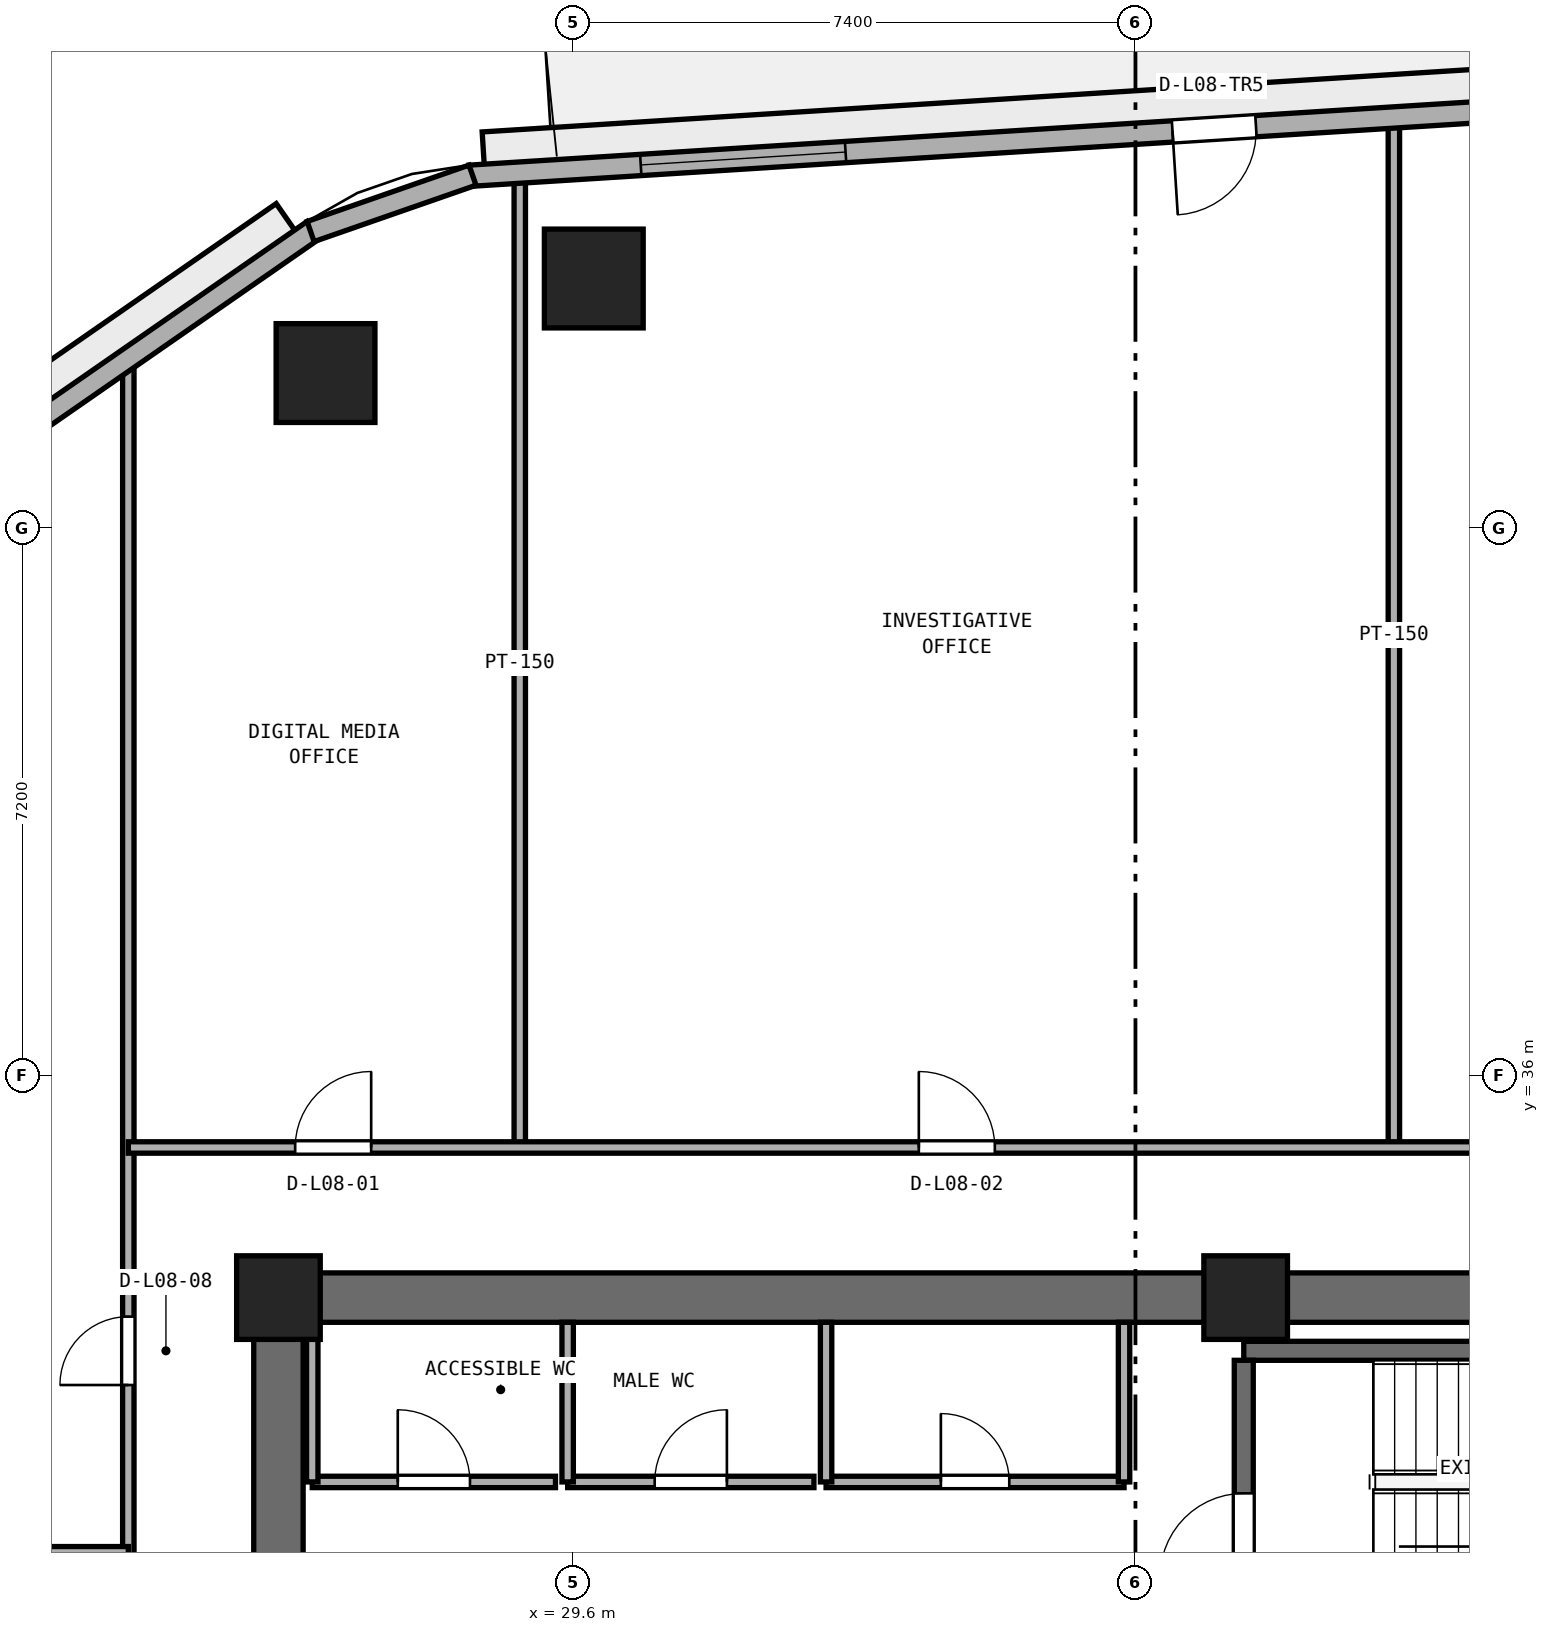
"""IFC4 building model, lengths in metres.
Left out: names, types, materials, properties, quantities, classifications, styles, units other than length and angle.
Written with IfcOpenShell. Run it as: python <this file> out.ifc"""

import sys

from ifc_helpers import new_model, si_unit, direction, frame, frame_2d, origin, origin_2d, place, context, subcontext, project, spatial, rectangle, extrude, element, fill, save


model = new_model("IFC4")
c1 = context("Model", 3, precision=1e-05, world=origin(), true_north=direction((0.0, 1.0)))
c2 = subcontext(c1, "Body", "Model", "MODEL_VIEW")
j1 = project(units=[si_unit("LENGTHUNIT", "METRE"), si_unit("PLANEANGLEUNIT", "RADIAN")], contexts=[c1])
p1 = place(None, origin())
s1 = spatial("IfcSite", under=j1, at=p1, CompositionType="ELEMENT")
p2 = place(p1, origin())
s2 = spatial("IfcBuilding", under=s1, at=p2, CompositionType="ELEMENT")
p3 = place(p2, frame((0.0, 0.0, 36.4)))
s3 = spatial("IfcBuildingStorey", under=s2, at=p3, CompositionType="ELEMENT", Elevation=36.4)
p4 = place(p3, frame((25.4, 33.075, 0.0), z_axis=(0.0, 0.0, 1.0), x_axis=(1.0, 0.0, 0.0)))
e1 = element("IfcWall", 1, at=p4, inside=s3, PredefinedType="SHEAR", context=c2, shape_type="SweptSolid", body=[
    extrude(rectangle(XDim=23.2, YDim=0.65, at=frame_2d((11.6, 0.0))), origin(), (0.0, 0.0, 1.0), 3.525),
])
p5 = place(p3, frame((25.725, 17.65, 0.0), z_axis=(0.0, 0.0, 1.0), x_axis=(0.0, 1.0, 0.0)))
e2 = element("IfcWall", 2, at=p5, inside=s3, PredefinedType="SHEAR", context=c2, shape_type="SweptSolid", body=[
    extrude(rectangle(XDim=15.1, YDim=0.65, at=frame_2d((7.55, 0.0))), origin(), (0.0, 0.0, 1.0), 3.525),
])
p6 = place(p5, frame((6.8, 0.0, 0.0)))
e3 = element("IfcOpeningElement", 3, at=p6, cuts=e2, PredefinedType="OPENING", context=c2, shape_type="SweptSolid", body=[
    extrude(rectangle(XDim=1.5, YDim=2.15, at=frame_2d((0.75, 1.075))), frame((0.0, 0.335, 0.0), z_axis=(0.0, -1.0, 0.0), x_axis=(1.0, 0.0, 0.0)), (0.0, 0.0, 1.0), 0.67),
])
for number, where, z_axis, x_axis in (
    (4, (38.45, 33.075, 0.0), (0.0, 0.0, 1.0), (1.0, 0.0, 0.0)),
    (5, (25.725, 33.075, 0.0), (0.0, 0.0, 1.0), (1.0, 0.0, 0.0)),
):
    element("IfcColumn", number, at=place(p3, frame(where, z_axis=z_axis, x_axis=x_axis)), inside=s3, PredefinedType="PILASTER", context=c2, shape_type="SweptSolid", body=[
        extrude(rectangle(XDim=1.1, YDim=1.1, at=origin_2d()), origin(), (0.0, 0.0, 1.0), 3.8),
    ])
for number, where, z_axis, x_axis in (
    (6, (29.874, 46.482, 0.0), (0.0, 0.0, 1.0), (1.0, 0.0, 0.0)),
    (7, (26.344, 45.238, 0.0), (0.0, 0.0, 1.0), (1.0, 0.0, 0.0)),
):
    element("IfcColumn", number, at=place(p3, frame(where, z_axis=z_axis, x_axis=x_axis)), inside=s3, PredefinedType="COLUMN", context=c2, shape_type="SweptSolid", body=[
        extrude(rectangle(XDim=1.3, YDim=1.3, at=origin_2d()), origin(), (0.0, 0.0, 1.0), 3.8),
    ])
p7 = place(p3, frame((38.425, 32.375, 0.0), z_axis=(0.0, 0.0, 1.0), x_axis=(1.0, 0.0, 0.0)))
e8 = element("IfcWall", 8, at=p7, inside=s3, PredefinedType="SHEAR", context=c2, shape_type="SweptSolid", body=[
    extrude(rectangle(XDim=7.3, YDim=0.25, at=frame_2d((3.65, 0.0))), origin(), (0.0, 0.0, 1.0), 3.525),
])
p8 = place(p3, frame((38.425, 29.05, 0.0), z_axis=(0.0, 0.0, 1.0), x_axis=(0.0, 1.0, 0.0)))
e9 = element("IfcWall", 9, at=p8, inside=s3, PredefinedType="SHEAR", context=c2, shape_type="SweptSolid", body=[
    extrude(rectangle(XDim=3.2, YDim=0.25, at=frame_2d((1.6, 0.0))), origin(), (0.0, 0.0, 1.0), 3.525),
])
p9 = place(p8, frame((0.35, 0.0, 0.0)))
e10 = element("IfcOpeningElement", 10, at=p9, cuts=e9, PredefinedType="OPENING", context=c2, shape_type="SweptSolid", body=[
    extrude(rectangle(XDim=1.1, YDim=2.15, at=frame_2d((0.55, 1.075))), frame((0.0, 0.135, 0.0), z_axis=(0.0, -1.0, 0.0), x_axis=(1.0, 0.0, 0.0)), (0.0, 0.0, 1.0), 0.27),
])
p10 = place(p3, frame((26.17, 30.65, 0.0), z_axis=(0.0, 0.0, 1.0), x_axis=(1.0, 0.0, 0.0)))
e11 = element("IfcWall", 11, at=p10, inside=s3, PredefinedType="PARTITIONING", context=c2, shape_type="SweptSolid", body=[
    extrude(rectangle(XDim=3.2, YDim=0.15, at=frame_2d((1.6, 0.0))), origin(), (0.0, 0.0, 1.0), 3.525),
])
p11 = place(p10, frame((1.125, 0.0, 0.0)))
e12 = element("IfcOpeningElement", 12, at=p11, cuts=e11, PredefinedType="OPENING", context=c2, shape_type="SweptSolid", body=[
    extrude(rectangle(XDim=0.95, YDim=2.1, at=frame_2d((0.475, 1.05))), frame((0.0, 0.085, 0.0), z_axis=(0.0, -1.0, 0.0), x_axis=(1.0, 0.0, 0.0)), (0.0, 0.0, 1.0), 0.17),
])
p12 = place(p3, frame((26.17, 30.65, 0.0), z_axis=(0.0, 0.0, 1.0), x_axis=(0.0, 1.0, 0.0)))
e13 = element("IfcWall", 13, at=p12, inside=s3, PredefinedType="PARTITIONING", context=c2, shape_type="SweptSolid", body=[
    extrude(rectangle(XDim=2.1, YDim=0.15, at=frame_2d((1.05, 0.0))), origin(), (0.0, 0.0, 1.0), 3.525),
])
p13 = place(p3, frame((29.53, 30.65, 0.0), z_axis=(0.0, 0.0, 1.0), x_axis=(1.0, 0.0, 0.0)))
e14 = element("IfcWall", 14, at=p13, inside=s3, PredefinedType="PARTITIONING", context=c2, shape_type="SweptSolid", body=[
    extrude(rectangle(XDim=3.24, YDim=0.15, at=frame_2d((1.62, 0.0))), origin(), (0.0, 0.0, 1.0), 3.525),
])
p14 = place(p13, frame((1.145, 0.0, 0.0)))
e15 = element("IfcOpeningElement", 15, at=p14, cuts=e14, PredefinedType="OPENING", context=c2, shape_type="SweptSolid", body=[
    extrude(rectangle(XDim=0.95, YDim=2.1, at=frame_2d((0.475, 1.05))), frame((0.0, 0.085, 0.0), z_axis=(0.0, -1.0, 0.0), x_axis=(1.0, 0.0, 0.0)), (0.0, 0.0, 1.0), 0.17),
])
p15 = place(p3, frame((29.53, 30.65, 0.0), z_axis=(0.0, 0.0, 1.0), x_axis=(0.0, 1.0, 0.0)))
e16 = element("IfcWall", 16, at=p15, inside=s3, PredefinedType="PARTITIONING", context=c2, shape_type="SweptSolid", body=[
    extrude(rectangle(XDim=2.1, YDim=0.15, at=frame_2d((1.05, 0.0))), origin(), (0.0, 0.0, 1.0), 3.525),
])
p16 = place(p3, frame((32.93, 30.65, 0.0), z_axis=(0.0, 0.0, 1.0), x_axis=(1.0, 0.0, 0.0)))
e17 = element("IfcWall", 17, at=p16, inside=s3, PredefinedType="PARTITIONING", context=c2, shape_type="SweptSolid", body=[
    extrude(rectangle(XDim=3.92, YDim=0.15, at=frame_2d((1.96, 0.0))), origin(), (0.0, 0.0, 1.0), 3.525),
])
p17 = place(p16, frame((1.51, 0.0, 0.0)))
e18 = element("IfcOpeningElement", 18, at=p17, cuts=e17, PredefinedType="OPENING", context=c2, shape_type="SweptSolid", body=[
    extrude(rectangle(XDim=0.9, YDim=2.1, at=frame_2d((0.45, 1.05))), frame((0.0, 0.085, 0.0), z_axis=(0.0, -1.0, 0.0), x_axis=(1.0, 0.0, 0.0)), (0.0, 0.0, 1.0), 0.17),
])
for number, where, z_axis, x_axis in (
    (19, (32.93, 30.65, 0.0), (0.0, 0.0, 1.0), (0.0, 1.0, 0.0)),
    (20, (36.85, 30.65, 0.0), (0.0, 0.0, 1.0), (0.0, 1.0, 0.0)),
):
    element("IfcWall", number, at=place(p3, frame(where, z_axis=z_axis, x_axis=x_axis)), inside=s3, PredefinedType="PARTITIONING", context=c2, shape_type="SweptSolid", body=[
        extrude(rectangle(XDim=2.1, YDim=0.15, at=frame_2d((1.05, 0.0))), origin(), (0.0, 0.0, 1.0), 3.525),
    ])
p18 = place(p3, frame((40.4, 35.05, 0.0), z_axis=(0.0, 0.0, 1.0), x_axis=(0.0, 1.0, 0.0)))
e21 = element("IfcWall", 21, at=p18, inside=s3, PredefinedType="PARTITIONING", context=c2, shape_type="SweptSolid", body=[
    extrude(rectangle(XDim=13.486, YDim=0.15, at=frame_2d((6.743, 0.0))), origin(), (0.0, 0.0, 1.0), 3.525),
])
p19 = place(p3, frame((28.9, 35.05, 0.0), z_axis=(0.0, 0.0, 1.0), x_axis=(0.0, 1.0, 0.0)))
e22 = element("IfcWall", 22, at=p19, inside=s3, PredefinedType="PARTITIONING", context=c2, shape_type="SweptSolid", body=[
    extrude(rectangle(XDim=12.761, YDim=0.15, at=frame_2d((6.38, 0.0))), origin(), (0.0, 0.0, 1.0), 3.525),
])
p20 = place(p3, frame((23.75, 4.769, 0.0), z_axis=(0.0, 0.0, 1.0), x_axis=(0.0, 1.0, 0.0)))
e23 = element("IfcWall", 23, at=p20, inside=s3, PredefinedType="PARTITIONING", context=c2, shape_type="SweptSolid", body=[
    extrude(rectangle(XDim=40.691, YDim=0.15, at=frame_2d((20.345, 0.0))), origin(), (0.0, 0.0, 1.0), 3.525),
])
p21 = place(p20, frame((14.006, 0.0, 0.0)))
e24 = element("IfcOpeningElement", 24, at=p21, cuts=e23, PredefinedType="OPENING", context=c2, shape_type="SweptSolid", body=[
    extrude(rectangle(XDim=0.9, YDim=2.1, at=frame_2d((0.45, 1.05))), frame((0.0, 0.085, 0.0), z_axis=(0.0, -1.0, 0.0), x_axis=(1.0, 0.0, 0.0)), (0.0, 0.0, 1.0), 0.17),
])
p22 = place(p20, frame((21.181, 0.0, 0.0)))
e25 = element("IfcOpeningElement", 25, at=p22, cuts=e23, PredefinedType="OPENING", context=c2, shape_type="SweptSolid", body=[
    extrude(rectangle(XDim=0.9, YDim=2.1, at=frame_2d((0.45, 1.05))), frame((0.0, 0.085, 0.0), z_axis=(0.0, -1.0, 0.0), x_axis=(1.0, 0.0, 0.0)), (0.0, 0.0, 1.0), 0.17),
])
p23 = place(p20, frame((27.156, 0.0, 0.0)))
e26 = element("IfcOpeningElement", 26, at=p23, cuts=e23, PredefinedType="OPENING", context=c2, shape_type="SweptSolid", body=[
    extrude(rectangle(XDim=0.9, YDim=2.1, at=frame_2d((0.45, 1.05))), frame((0.0, 0.085, 0.0), z_axis=(0.0, -1.0, 0.0), x_axis=(1.0, 0.0, 0.0)), (0.0, 0.0, 1.0), 0.17),
])
p24 = place(p3, frame((9.605, 29.7, 0.0), z_axis=(0.0, 0.0, 1.0), x_axis=(1.0, 0.0, 0.0)))
e27 = element("IfcWall", 27, at=p24, inside=s3, PredefinedType="PARTITIONING", context=c2, shape_type="SweptSolid", body=[
    extrude(rectangle(XDim=14.145, YDim=0.2, at=frame_2d((7.073, 0.0))), origin(), (0.0, 0.0, 1.0), 3.525),
])
p25 = place(p3, frame((23.75, 35.05, 0.0), z_axis=(0.0, 0.0, 1.0), x_axis=(1.0, 0.0, 0.0)))
e28 = element("IfcWall", 28, at=p25, inside=s3, PredefinedType="PARTITIONING", context=c2, shape_type="SweptSolid", body=[
    extrude(rectangle(XDim=26.5, YDim=0.15, at=frame_2d((13.25, 0.0))), origin(), (0.0, 0.0, 1.0), 3.525),
])
p26 = place(p25, frame((2.195, 0.0, 0.0)))
e29 = element("IfcOpeningElement", 29, at=p26, cuts=e28, PredefinedType="OPENING", context=c2, shape_type="SweptSolid", body=[
    extrude(rectangle(XDim=1.0, YDim=2.12, at=frame_2d((0.5, 1.06))), frame((0.0, 0.085, 0.0), z_axis=(0.0, -1.0, 0.0), x_axis=(1.0, 0.0, 0.0)), (0.0, 0.0, 1.0), 0.17),
])
p27 = place(p25, frame((10.4, 0.0, 0.0)))
e30 = element("IfcOpeningElement", 30, at=p27, cuts=e28, PredefinedType="OPENING", context=c2, shape_type="SweptSolid", body=[
    extrude(rectangle(XDim=1.0, YDim=2.12, at=frame_2d((0.5, 1.06))), frame((0.0, 0.085, 0.0), z_axis=(0.0, -1.0, 0.0), x_axis=(1.0, 0.0, 0.0)), (0.0, 0.0, 1.0), 0.17),
])
p28 = place(p25, frame((21.005, 0.0, 0.0)))
e31 = element("IfcOpeningElement", 31, at=p28, cuts=e28, PredefinedType="OPENING", context=c2, shape_type="SweptSolid", body=[
    extrude(rectangle(XDim=0.9, YDim=2.1, at=frame_2d((0.45, 1.05))), frame((0.0, 0.085, 0.0), z_axis=(0.0, -1.0, 0.0), x_axis=(1.0, 0.0, 0.0)), (0.0, 0.0, 1.0), 0.17),
])
p29 = place(p3, frame((47.832, 49.069, 0.0), z_axis=(0.0, 0.0, 1.0), x_axis=(-0.998017725054, -0.062933460723, 0.0)))
e32 = element("IfcWall", 32, at=p29, inside=s3, PredefinedType="STANDARD", context=c2, shape_type="SweptSolid", body=[
    extrude(rectangle(XDim=19.629, YDim=0.28, at=frame_2d((9.815, 0.0))), origin(), (0.0, 0.0, 1.0), 3.525),
])
p30 = place(p29, frame((9.265, 0.0, 0.0)))
e33 = element("IfcOpeningElement", 33, at=p30, cuts=e32, PredefinedType="OPENING", context=c2, shape_type="SweptSolid", body=[
    extrude(rectangle(XDim=1.1, YDim=2.2, at=frame_2d((0.55, 1.1))), frame((0.0, 0.15, 0.0), z_axis=(0.0, -1.0, 0.0), x_axis=(1.0, 0.0, 0.0)), (0.0, 0.0, 1.0), 0.3),
])
p31 = place(p29, frame((2.255, 0.0, 0.9)))
e34 = element("IfcOpeningElement", 34, at=p31, cuts=e32, PredefinedType="OPENING", context=c2, shape_type="SweptSolid", body=[
    extrude(rectangle(XDim=2.7, YDim=1.75, at=frame_2d((1.35, 0.875))), frame((0.0, 0.15, 0.0), z_axis=(0.0, -1.0, 0.0), x_axis=(1.0, 0.0, 0.0)), (0.0, 0.0, 1.0), 0.3),
])
p32 = place(p29, frame((14.675, 0.0, 0.9)))
e35 = element("IfcOpeningElement", 35, at=p32, cuts=e32, PredefinedType="OPENING", context=c2, shape_type="SweptSolid", body=[
    extrude(rectangle(XDim=2.7, YDim=1.75, at=frame_2d((1.35, 0.875))), frame((0.0, 0.15, 0.0), z_axis=(0.0, -1.0, 0.0), x_axis=(1.0, 0.0, 0.0)), (0.0, 0.0, 1.0), 0.3),
])
p33 = place(p3, frame((26.182, 47.118, 0.0), z_axis=(0.0, 0.0, 1.0), x_axis=(-0.821547956627, -0.570139417127, 0.0)))
e36 = element("IfcWall", 36, at=p33, inside=s3, PredefinedType="STANDARD", context=c2, shape_type="SweptSolid", body=[
    extrude(rectangle(XDim=18.132, YDim=0.28, at=frame_2d((9.066, 0.0))), origin(), (0.0, 0.0, 1.0), 3.525),
])
p34 = place(p33, frame((7.716, 0.0, 0.9)))
e37 = element("IfcOpeningElement", 37, at=p34, cuts=e36, PredefinedType="OPENING", context=c2, shape_type="SweptSolid", body=[
    extrude(rectangle(XDim=2.7, YDim=1.75, at=frame_2d((1.35, 0.875))), frame((0.0, 0.15, 0.0), z_axis=(0.0, -1.0, 0.0), x_axis=(1.0, 0.0, 0.0)), (0.0, 0.0, 1.0), 0.3),
])
p35 = place(p33, frame((13.427, 0.0, 0.9)))
e38 = element("IfcOpeningElement", 38, at=p35, cuts=e36, PredefinedType="OPENING", context=c2, shape_type="SweptSolid", body=[
    extrude(rectangle(XDim=2.7, YDim=1.75, at=frame_2d((1.35, 0.875))), frame((0.0, 0.15, 0.0), z_axis=(0.0, -1.0, 0.0), x_axis=(1.0, 0.0, 0.0)), (0.0, 0.0, 1.0), 0.3),
])
p36 = place(p3, frame((28.278, 47.842, 0.0), z_axis=(0.0, 0.0, 1.0), x_axis=(-0.9444559001, -0.328638179106, 0.0)))
e39 = element("IfcWall", 39, at=p36, inside=s3, PredefinedType="STANDARD", context=c2, shape_type="SweptSolid", body=[
    extrude(rectangle(XDim=2.255, YDim=0.28, at=frame_2d((1.128, 0.0))), origin(), (0.0, 0.0, 1.0), 3.525),
])
p37 = place(p9, origin())
e40 = element("IfcDoor", 40, at=p37, inside=s3, OperationType="SINGLE_SWING_LEFT", PredefinedType="DOOR", context=c2, shape_type="SweptSolid", body=[
    extrude(rectangle(XDim=1.1, YDim=2.15, at=frame_2d((0.55, 1.075))), frame((0.0, 0.025, 0.0), z_axis=(0.0, -1.0, 0.0), x_axis=(1.0, 0.0, 0.0)), (0.0, 0.0, 1.0), 0.05),
])
fill(e10, e40)
p38 = place(p11, origin())
e41 = element("IfcDoor", 41, at=p38, inside=s3, OperationType="SINGLE_SWING_LEFT", PredefinedType="DOOR", context=c2, shape_type="SweptSolid", body=[
    extrude(rectangle(XDim=0.95, YDim=2.1, at=frame_2d((0.475, 1.05))), frame((0.0, 0.025, 0.0), z_axis=(0.0, -1.0, 0.0), x_axis=(1.0, 0.0, 0.0)), (0.0, 0.0, 1.0), 0.05),
])
fill(e12, e41)
p39 = place(p14, origin())
e42 = element("IfcDoor", 42, at=p39, inside=s3, OperationType="SINGLE_SWING_RIGHT", PredefinedType="DOOR", context=c2, shape_type="SweptSolid", body=[
    extrude(rectangle(XDim=0.95, YDim=2.1, at=frame_2d((0.475, 1.05))), frame((0.0, 0.025, 0.0), z_axis=(0.0, -1.0, 0.0), x_axis=(1.0, 0.0, 0.0)), (0.0, 0.0, 1.0), 0.05),
])
fill(e15, e42)
p40 = place(p17, origin())
e43 = element("IfcDoor", 43, at=p40, inside=s3, OperationType="SINGLE_SWING_LEFT", PredefinedType="DOOR", context=c2, shape_type="SweptSolid", body=[
    extrude(rectangle(XDim=0.9, YDim=2.1, at=frame_2d((0.45, 1.05))), frame((0.0, 0.025, 0.0), z_axis=(0.0, -1.0, 0.0), x_axis=(1.0, 0.0, 0.0)), (0.0, 0.0, 1.0), 0.05),
])
fill(e18, e43)
p41 = place(p26, origin())
e44 = element("IfcDoor", 44, at=p41, inside=s3, OperationType="SINGLE_SWING_RIGHT", PredefinedType="DOOR", context=c2, shape_type="SweptSolid", body=[
    extrude(rectangle(XDim=1.0, YDim=2.12, at=frame_2d((0.5, 1.06))), frame((0.0, 0.025, 0.0), z_axis=(0.0, -1.0, 0.0), x_axis=(1.0, 0.0, 0.0)), (0.0, 0.0, 1.0), 0.05),
])
fill(e29, e44)
p42 = place(p27, origin())
e45 = element("IfcDoor", 45, at=p42, inside=s3, OperationType="SINGLE_SWING_LEFT", PredefinedType="DOOR", context=c2, shape_type="SweptSolid", body=[
    extrude(rectangle(XDim=1.0, YDim=2.12, at=frame_2d((0.5, 1.06))), frame((0.0, 0.025, 0.0), z_axis=(0.0, -1.0, 0.0), x_axis=(1.0, 0.0, 0.0)), (0.0, 0.0, 1.0), 0.05),
])
fill(e30, e45)
p43 = place(p23, origin())
e46 = element("IfcDoor", 46, at=p43, inside=s3, OperationType="SINGLE_SWING_LEFT", PredefinedType="DOOR", context=c2, shape_type="SweptSolid", body=[
    extrude(rectangle(XDim=0.9, YDim=2.1, at=frame_2d((0.45, 1.05))), frame((0.0, 0.025, 0.0), z_axis=(0.0, -1.0, 0.0), x_axis=(1.0, 0.0, 0.0)), (0.0, 0.0, 1.0), 0.05),
])
fill(e26, e46)
p44 = place(p30, origin())
e47 = element("IfcDoor", 47, at=p44, inside=s3, OperationType="SINGLE_SWING_RIGHT", PredefinedType="DOOR", context=c2, shape_type="SweptSolid", body=[
    extrude(rectangle(XDim=1.1, YDim=2.2, at=frame_2d((0.55, 1.1))), frame((0.0, 0.025, 0.0), z_axis=(0.0, -1.0, 0.0), x_axis=(1.0, 0.0, 0.0)), (0.0, 0.0, 1.0), 0.05),
])
fill(e33, e47)
p45 = place(p32, origin())
e48 = element("IfcWindow", 48, at=p45, inside=s3, PartitioningType="SINGLE_PANEL", PredefinedType="WINDOW", context=c2, shape_type="SweptSolid", body=[
    extrude(rectangle(XDim=2.7, YDim=1.75, at=frame_2d((1.35, 0.875))), frame((0.0, 0.03, 0.0), z_axis=(0.0, -1.0, 0.0), x_axis=(1.0, 0.0, 0.0)), (0.0, 0.0, 1.0), 0.06),
])
fill(e35, e48)
save(model, sys.argv[1])
